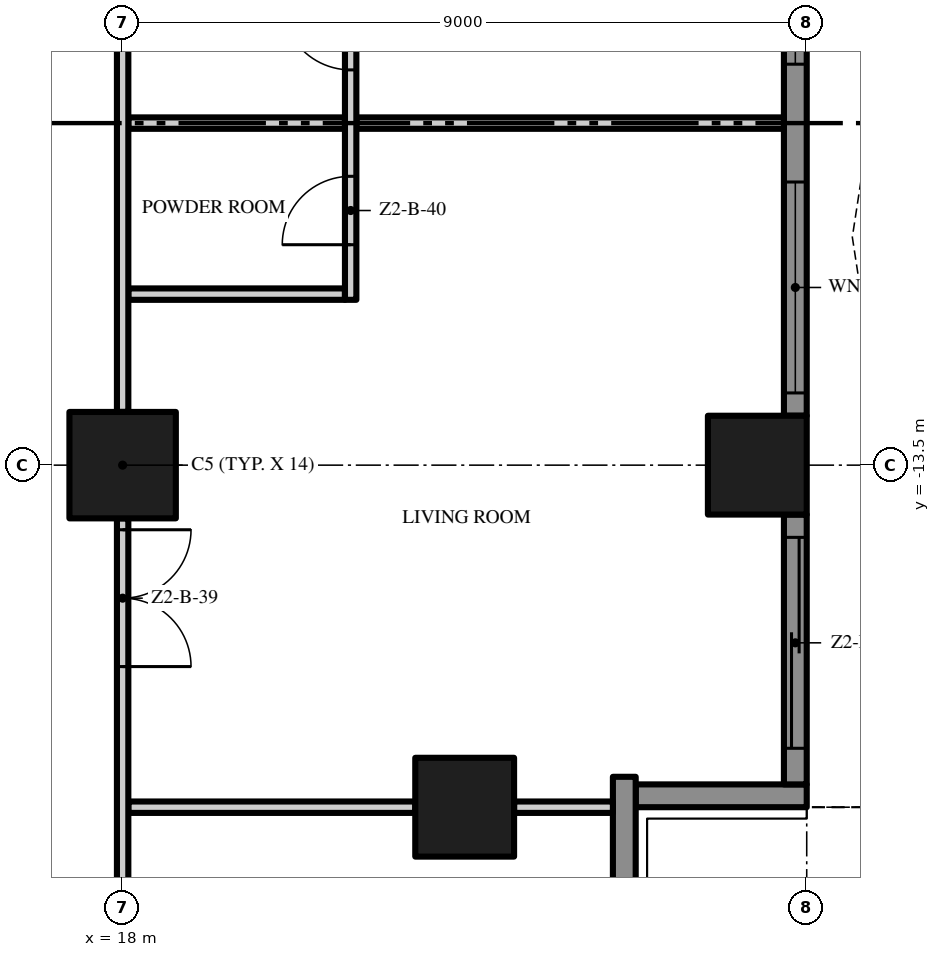
"""IFC4 building model, lengths in metres.
Left out: names, types, materials, properties, quantities, classifications, styles, units other than length and angle.
Written with IfcOpenShell. Run it as: python <this file> out.ifc"""

import sys

from ifc_helpers import new_model, si_unit, direction, frame, frame_2d, origin, origin_2d, place, context, subcontext, project, spatial, polyline, rectangle, outline, extrude, element, fill, save


model = new_model("IFC4")
c1 = context("Model", 3, precision=1e-05, world=origin(), true_north=direction((0.0, 1.0)))
c2 = subcontext(c1, "Body", "Model", "MODEL_VIEW")
j1 = project(units=[si_unit("LENGTHUNIT", "METRE"), si_unit("PLANEANGLEUNIT", "RADIAN")], contexts=[c1])
p1 = place(None, origin())
s1 = spatial("IfcSite", under=j1, at=p1, CompositionType="ELEMENT")
p2 = place(p1, origin())
s2 = spatial("IfcBuilding", under=s1, at=p2, CompositionType="ELEMENT")
p3 = place(p2, frame((0.0, 0.0, 84.6)))
s3 = spatial("IfcBuildingStorey", under=s2, at=p3, CompositionType="ELEMENT", Elevation=84.6)
p4 = place(p3, frame((18.0, -13.5, 0.0), z_axis=(0.0, 0.0, 1.0), x_axis=(1.0, 0.0, 0.0)))
e1 = element("IfcColumn", 1, at=p4, inside=s3, PredefinedType="COLUMN", context=c2, shape_type="SweptSolid", body=[
    extrude(rectangle(XDim=1.4, YDim=1.4, at=origin_2d()), origin(), (0.0, 0.0, 1.0), 3.5),
])
for number, where, z_axis, x_axis in (
    (2, (26.35, -13.5, 0.0), (0.0, 0.0, 1.0), (1.0, 0.0, 0.0)),
    (3, (22.5, -18.0, 0.0), (0.0, 0.0, 1.0), (1.0, 0.0, 0.0)),
):
    element("IfcColumn", number, at=place(p3, frame(where, z_axis=z_axis, x_axis=x_axis)), inside=s3, PredefinedType="COLUMN", context=c2, shape_type="SweptSolid", body=[
        extrude(rectangle(XDim=1.3, YDim=1.3, at=origin_2d()), origin(), (0.0, 0.0, 1.0), 3.5),
    ])
p5 = place(p3, frame((24.6, -17.6, 0.0), z_axis=(0.0, 0.0, 1.0), x_axis=(0.0, -1.0, 0.0)))
e4 = element("IfcWall", 4, at=p5, inside=s3, PredefinedType="SOLIDWALL", context=c2, shape_type="SweptSolid", body=[
    extrude(rectangle(XDim=2.35, YDim=0.3, at=frame_2d((1.175, 0.0))), origin(), (0.0, 0.0, 1.0), 3.5),
])
p6 = place(p3, frame((27.0, -17.85, 0.0), z_axis=(0.0, 0.0, 1.0), x_axis=(-1.0, 0.0, 0.0)))
e5 = element("IfcWall", 5, at=p6, inside=s3, PredefinedType="SOLIDWALL", context=c2, shape_type="SweptSolid", body=[
    extrude(rectangle(XDim=2.25, YDim=0.3, at=frame_2d((1.125, 0.0))), origin(), (0.0, 0.0, 1.0), 3.5),
])
p7 = place(p3, frame((26.85, -14.15, 0.0), z_axis=(0.0, 0.0, 1.0), x_axis=(0.0, -1.0, 0.0)))
e6 = element("IfcWall", 6, at=p7, inside=s3, PredefinedType="SOLIDWALL", context=c2, shape_type="SweptSolid", body=[
    extrude(rectangle(XDim=3.55, YDim=0.3, at=frame_2d((1.775, 0.0))), origin(), (0.0, 0.0, 1.0), 3.5),
])
p8 = place(p7, frame((0.3, 0.0, 0.0)))
e7 = element("IfcOpeningElement", 7, at=p8, cuts=e6, PredefinedType="OPENING", context=c2, shape_type="SweptSolid", body=[
    extrude(rectangle(XDim=2.775, YDim=2.4, at=frame_2d((1.387, 1.2))), frame((0.0, 0.16, 0.0), z_axis=(0.0, -1.0, 0.0), x_axis=(1.0, 0.0, 0.0)), (0.0, 0.0, 1.0), 0.32),
])
p9 = place(p3, frame((26.85, -5.15, 0.0), z_axis=(0.0, 0.0, 1.0), x_axis=(0.0, -1.0, 0.0)))
e8 = element("IfcWall", 8, at=p9, inside=s3, PredefinedType="SOLIDWALL", context=c2, shape_type="SweptSolid", body=[
    extrude(rectangle(XDim=7.7, YDim=0.3, at=frame_2d((3.85, 0.0))), origin(), (0.0, 0.0, 1.0), 3.5),
])
p10 = place(p9, frame((4.625, 0.0, 0.45)))
e9 = element("IfcOpeningElement", 9, at=p10, cuts=e8, PredefinedType="OPENING", context=c2, shape_type="SweptSolid", body=[
    extrude(rectangle(XDim=2.775, YDim=2.65, at=frame_2d((1.387, 1.325))), frame((0.0, 0.16, 0.0), z_axis=(0.0, -1.0, 0.0), x_axis=(1.0, 0.0, 0.0)), (0.0, 0.0, 1.0), 0.32),
])
p11 = place(p9, frame((0.3, 0.0, 0.45)))
e10 = element("IfcOpeningElement", 10, at=p11, cuts=e8, PredefinedType="OPENING", context=c2, shape_type="SweptSolid", body=[
    extrude(rectangle(XDim=2.775, YDim=2.65, at=frame_2d((1.387, 1.325))), frame((0.0, 0.16, 0.0), z_axis=(0.0, -1.0, 0.0), x_axis=(1.0, 0.0, 0.0)), (0.0, 0.0, 1.0), 0.32),
])
p12 = place(p3, origin())
e11 = element("IfcWall", 11, at=p12, inside=s3, PredefinedType="USERDEFINED", context=c2, shape_type="SweptSolid", body=[
    extrude(outline(polyline([(30.0, -18.0), (29.771, -16.5), (29.171, -15.0), (28.429, -13.5), (27.829, -12.0), (27.6, -10.5), (27.829, -9.0), (28.429, -7.5), (29.171, -6.0), (29.771, -4.5), (30.0, -3.0), (29.771, -1.5), (29.171, 0.0), (28.429, 1.5), (27.829, 3.0), (27.6, 4.5), (27.829, 6.0), (28.429, 7.5), (29.171, 9.0), (29.771, 10.5), (30.0, 12.0), (29.771, 13.5), (29.171, 15.0), (28.429, 16.5), (27.829, 18.0), (27.597, 17.907), (28.201, 16.398), (28.942, 14.898), (29.528, 13.434), (29.747, 12.0), (29.528, 10.566), (28.942, 9.102), (28.201, 7.602), (27.586, 6.066), (27.347, 4.5), (27.586, 2.934), (28.201, 1.398), (28.942, -0.102), (29.528, -1.566), (29.747, -3.0), (29.528, -4.434), (28.942, -5.898), (28.201, -7.398), (27.586, -8.934), (27.347, -10.5), (27.586, -12.066), (28.201, -13.602), (28.942, -15.102), (29.528, -16.566), (29.753, -18.038), (30.0, -18.0)])), origin(), (0.0, 0.0, 1.0), 0.9),
])
p13 = place(p3, frame((18.075, -18.0, 0.0), z_axis=(0.0, 0.0, 1.0), x_axis=(1.0, 0.0, 0.0)))
e12 = element("IfcWall", 12, at=p13, inside=s3, PredefinedType="PARTITIONING", context=c2, shape_type="SweptSolid", body=[
    extrude(rectangle(XDim=3.775, YDim=0.15, at=frame_2d((1.887, 0.0))), origin(), (0.0, 0.0, 1.0), 3.5),
])
p14 = place(p3, frame((23.15, -18.0, 0.0), z_axis=(0.0, 0.0, 1.0), x_axis=(1.0, 0.0, 0.0)))
e13 = element("IfcWall", 13, at=p14, inside=s3, PredefinedType="PARTITIONING", context=c2, shape_type="SweptSolid", body=[
    extrude(rectangle(XDim=1.3, YDim=0.15, at=frame_2d((0.65, 0.0))), origin(), (0.0, 0.0, 1.0), 3.5),
])
for number, where, z_axis, x_axis in (
    (14, (18.075, -11.25, 0.0), (0.0, 0.0, 1.0), (1.0, 0.0, 0.0)),
    (15, (18.075, -9.0, 0.0), (0.0, 0.0, 1.0), (1.0, 0.0, 0.0)),
):
    element("IfcWall", number, at=place(p3, frame(where, z_axis=z_axis, x_axis=x_axis)), inside=s3, PredefinedType="PARTITIONING", context=c2, shape_type="SweptSolid", body=[
        extrude(rectangle(XDim=2.85, YDim=0.15, at=frame_2d((1.425, 0.0))), origin(), (0.0, 0.0, 1.0), 3.5),
    ])
p15 = place(p3, frame((21.075, -9.0, 0.0), z_axis=(0.0, 0.0, 1.0), x_axis=(1.0, 0.0, 0.0)))
e16 = element("IfcWall", 16, at=p15, inside=s3, PredefinedType="PARTITIONING", context=c2, shape_type="SweptSolid", body=[
    extrude(rectangle(XDim=5.625, YDim=0.15, at=frame_2d((2.812, 0.0))), origin(), (0.0, 0.0, 1.0), 3.5),
])
p16 = place(p3, frame((18.0, -14.2, 0.0), z_axis=(0.0, 0.0, 1.0), x_axis=(0.0, -1.0, 0.0)))
e17 = element("IfcWall", 17, at=p16, inside=s3, PredefinedType="PARTITIONING", context=c2, shape_type="SweptSolid", body=[
    extrude(rectangle(XDim=7.0, YDim=0.15, at=frame_2d((3.5, 0.0))), origin(), (0.0, 0.0, 1.0), 3.5),
])
p17 = place(p16, frame((5.3, 0.0, 0.0)))
e18 = element("IfcOpeningElement", 18, at=p17, cuts=e17, PredefinedType="OPENING", context=c2, shape_type="SweptSolid", body=[
    extrude(rectangle(XDim=1.5, YDim=2.4, at=frame_2d((0.75, 1.2))), frame((0.0, 0.085, 0.0), z_axis=(0.0, -1.0, 0.0), x_axis=(1.0, 0.0, 0.0)), (0.0, 0.0, 1.0), 0.17),
])
p18 = place(p16, frame((0.15, 0.0, 0.0)))
e19 = element("IfcOpeningElement", 19, at=p18, cuts=e17, PredefinedType="OPENING", context=c2, shape_type="SweptSolid", body=[
    extrude(rectangle(XDim=1.8, YDim=2.4, at=frame_2d((0.9, 1.2))), frame((0.0, 0.085, 0.0), z_axis=(0.0, -1.0, 0.0), x_axis=(1.0, 0.0, 0.0)), (0.0, 0.0, 1.0), 0.17),
])
p19 = place(p3, frame((18.0, -5.2, 0.0), z_axis=(0.0, 0.0, 1.0), x_axis=(0.0, -1.0, 0.0)))
e20 = element("IfcWall", 20, at=p19, inside=s3, PredefinedType="PARTITIONING", context=c2, shape_type="SweptSolid", body=[
    extrude(rectangle(XDim=7.6, YDim=0.15, at=frame_2d((3.8, 0.0))), origin(), (0.0, 0.0, 1.0), 3.5),
])
p20 = place(p19, frame((0.15, 0.0, 0.0)))
e21 = element("IfcOpeningElement", 21, at=p20, cuts=e20, PredefinedType="OPENING", context=c2, shape_type="SweptSolid", body=[
    extrude(rectangle(XDim=1.0, YDim=2.4, at=frame_2d((0.5, 1.2))), frame((0.0, 0.085, 0.0), z_axis=(0.0, -1.0, 0.0), x_axis=(1.0, 0.0, 0.0)), (0.0, 0.0, 1.0), 0.17),
])
p21 = place(p3, frame((21.0, -11.325, 0.0), z_axis=(0.0, 0.0, 1.0), x_axis=(0.0, 1.0, 0.0)))
e22 = element("IfcWall", 22, at=p21, inside=s3, PredefinedType="PARTITIONING", context=c2, shape_type="SweptSolid", body=[
    extrude(rectangle(XDim=4.65, YDim=0.15, at=frame_2d((2.325, 0.0))), origin(), (0.0, 0.0, 1.0), 3.5),
])
p22 = place(p21, frame((0.725, 0.0, 0.0)))
e23 = element("IfcOpeningElement", 23, at=p22, cuts=e22, PredefinedType="OPENING", context=c2, shape_type="SweptSolid", body=[
    extrude(rectangle(XDim=0.9, YDim=2.1, at=frame_2d((0.45, 1.05))), frame((0.0, 0.085, 0.0), z_axis=(0.0, -1.0, 0.0), x_axis=(1.0, 0.0, 0.0)), (0.0, 0.0, 1.0), 0.17),
])
p23 = place(p21, frame((3.025, 0.0, 0.0)))
e24 = element("IfcOpeningElement", 24, at=p23, cuts=e22, PredefinedType="OPENING", context=c2, shape_type="SweptSolid", body=[
    extrude(rectangle(XDim=0.9, YDim=2.1, at=frame_2d((0.45, 1.05))), frame((0.0, 0.085, 0.0), z_axis=(0.0, -1.0, 0.0), x_axis=(1.0, 0.0, 0.0)), (0.0, 0.0, 1.0), 0.17),
])
p24 = place(p8, origin())
e25 = element("IfcDoor", 25, at=p24, inside=s3, OperationType="SINGLE_SWING_LEFT", PredefinedType="DOOR", context=c2, shape_type="SweptSolid", body=[
    extrude(rectangle(XDim=2.775, YDim=2.4, at=frame_2d((1.387, 1.2))), frame((0.0, 0.025, 0.0), z_axis=(0.0, -1.0, 0.0), x_axis=(1.0, 0.0, 0.0)), (0.0, 0.0, 1.0), 0.05),
])
fill(e7, e25)
p25 = place(p10, origin())
e26 = element("IfcWindow", 26, at=p25, inside=s3, PartitioningType="SINGLE_PANEL", PredefinedType="WINDOW", context=c2, shape_type="SweptSolid", body=[
    extrude(rectangle(XDim=2.775, YDim=2.65, at=frame_2d((1.387, 1.325))), frame((0.0, 0.03, 0.0), z_axis=(0.0, -1.0, 0.0), x_axis=(1.0, 0.0, 0.0)), (0.0, 0.0, 1.0), 0.06),
])
fill(e9, e26)
p26 = place(p11, origin())
e27 = element("IfcWindow", 27, at=p26, inside=s3, PartitioningType="SINGLE_PANEL", PredefinedType="WINDOW", context=c2, shape_type="SweptSolid", body=[
    extrude(rectangle(XDim=2.775, YDim=2.65, at=frame_2d((1.387, 1.325))), frame((0.0, 0.03, 0.0), z_axis=(0.0, -1.0, 0.0), x_axis=(1.0, 0.0, 0.0)), (0.0, 0.0, 1.0), 0.06),
])
fill(e10, e27)
p27 = place(p18, origin())
e28 = element("IfcDoor", 28, at=p27, inside=s3, OperationType="DOUBLE_DOOR_SINGLE_SWING", PredefinedType="DOOR", context=c2, shape_type="SweptSolid", body=[
    extrude(rectangle(XDim=1.8, YDim=2.4, at=frame_2d((0.9, 1.2))), frame((0.0, 0.025, 0.0), z_axis=(0.0, -1.0, 0.0), x_axis=(1.0, 0.0, 0.0)), (0.0, 0.0, 1.0), 0.05),
])
fill(e19, e28)
p28 = place(p22, origin())
e29 = element("IfcDoor", 29, at=p28, inside=s3, OperationType="SINGLE_SWING_LEFT", PredefinedType="DOOR", context=c2, shape_type="SweptSolid", body=[
    extrude(rectangle(XDim=0.9, YDim=2.1, at=frame_2d((0.45, 1.05))), frame((0.0, 0.025, 0.0), z_axis=(0.0, -1.0, 0.0), x_axis=(1.0, 0.0, 0.0)), (0.0, 0.0, 1.0), 0.05),
])
fill(e23, e29)
p29 = place(p23, origin())
e30 = element("IfcDoor", 30, at=p29, inside=s3, OperationType="SINGLE_SWING_RIGHT", PredefinedType="DOOR", context=c2, shape_type="SweptSolid", body=[
    extrude(rectangle(XDim=0.9, YDim=2.1, at=frame_2d((0.45, 1.05))), frame((0.0, 0.025, 0.0), z_axis=(0.0, -1.0, 0.0), x_axis=(1.0, 0.0, 0.0)), (0.0, 0.0, 1.0), 0.05),
])
fill(e24, e30)
save(model, sys.argv[1])
